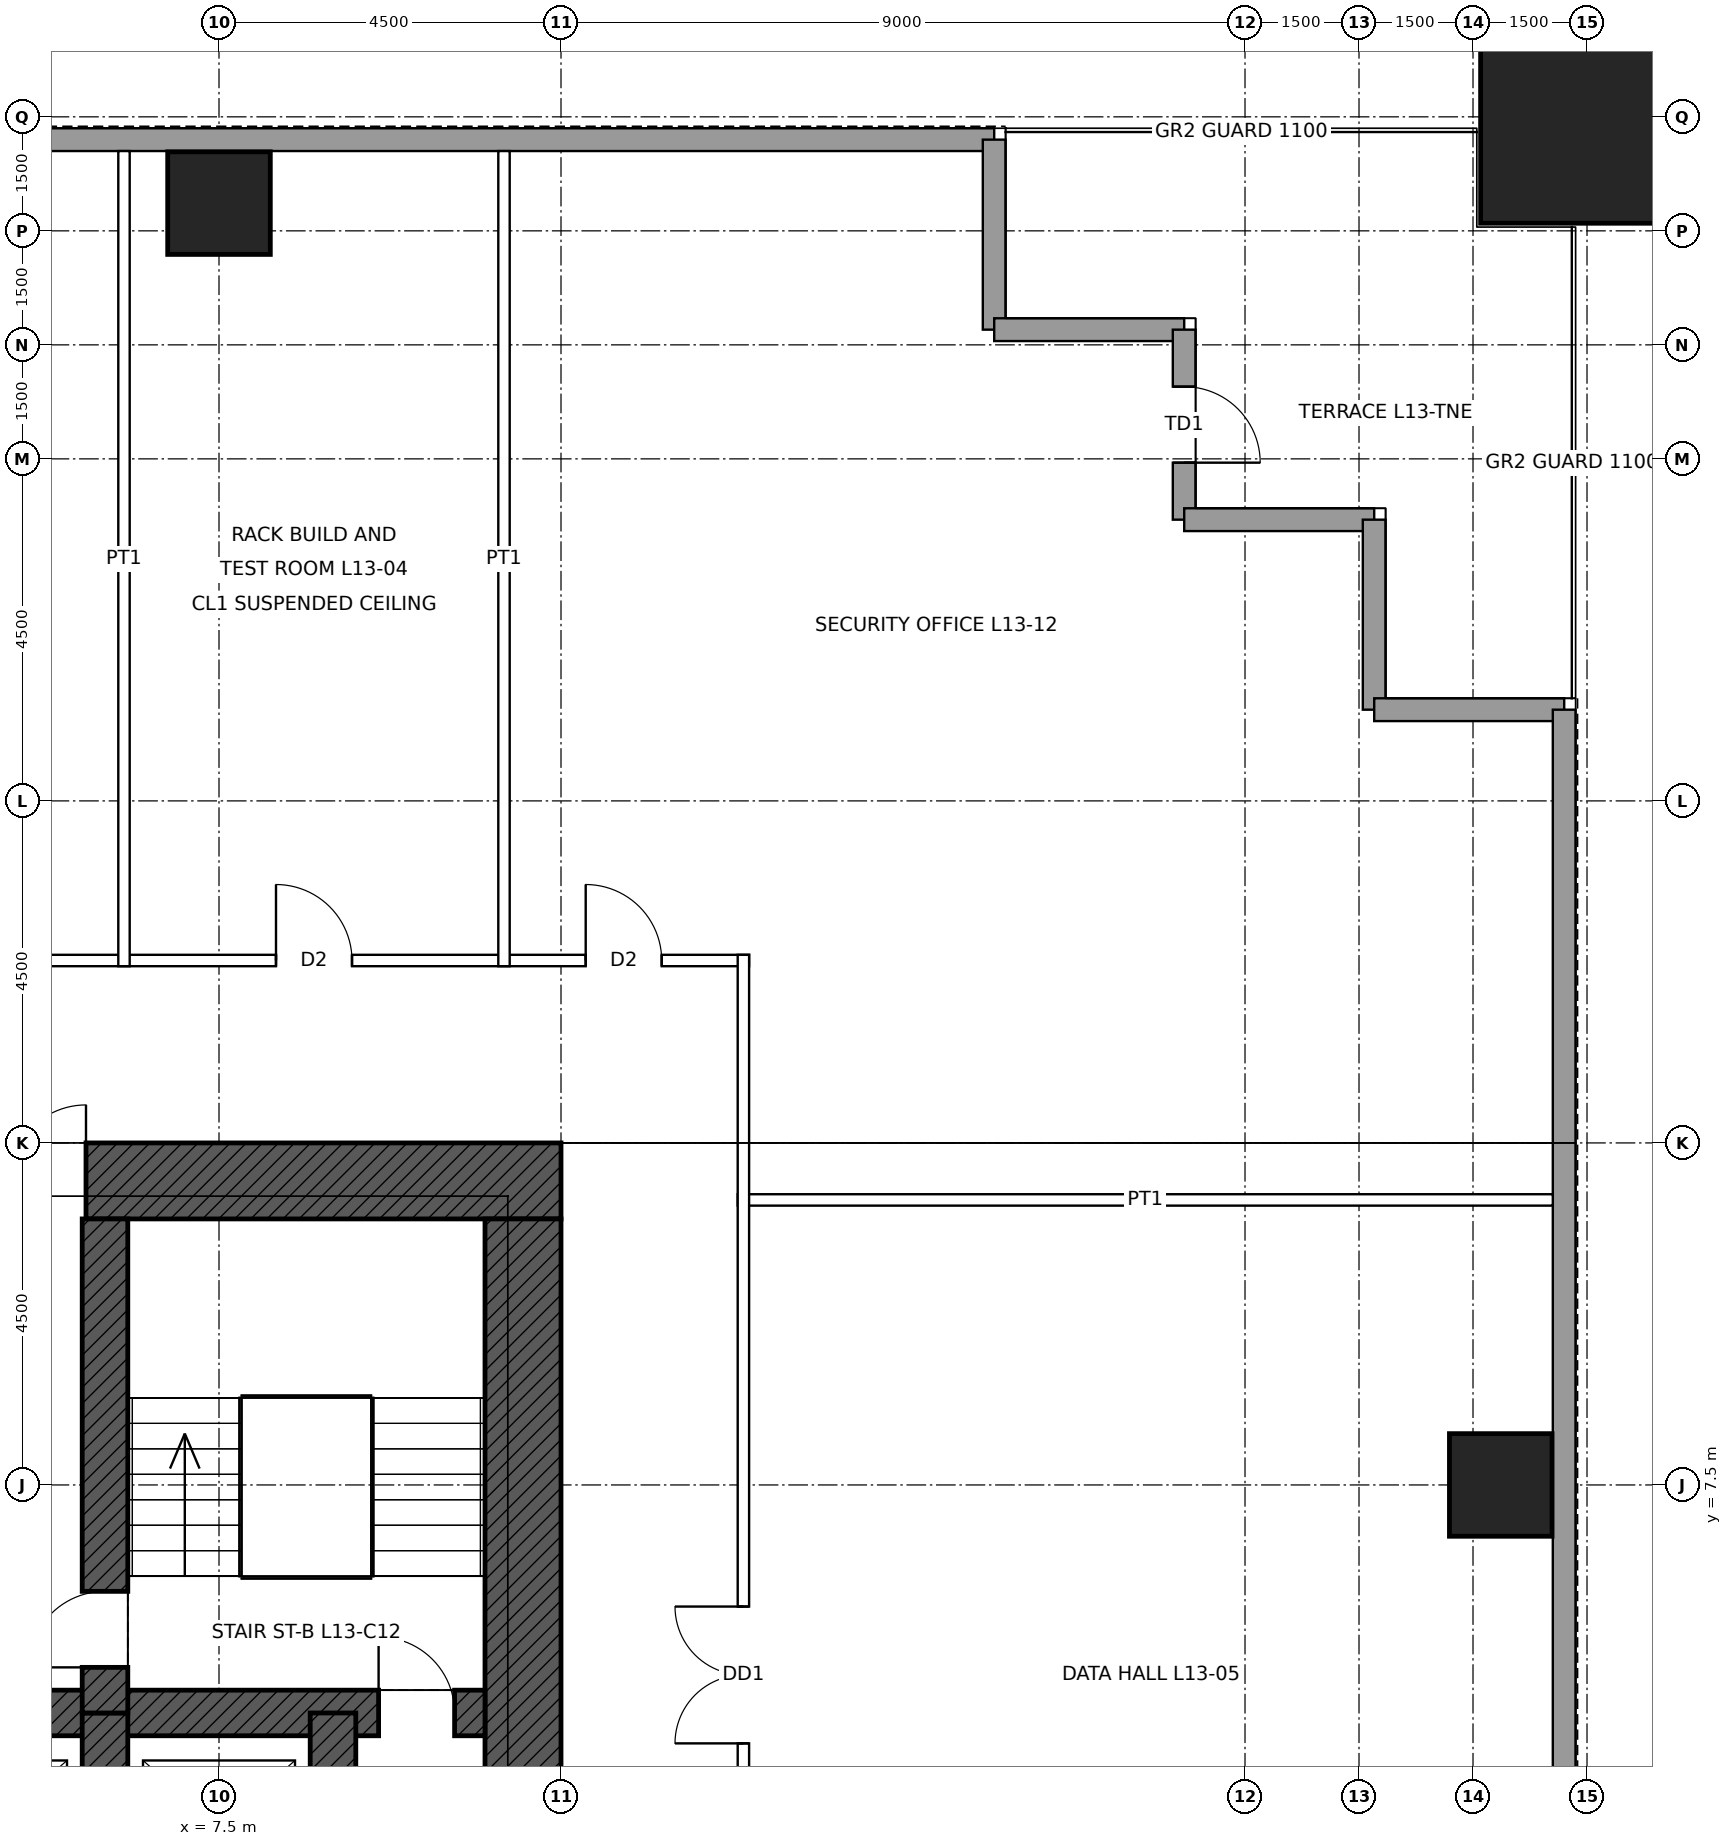
"""IFC4 building model, lengths in metres.
Left out: names, types, materials, properties, quantities, classifications, styles, units other than length and angle.
Written with IfcOpenShell. Run it as: python <this file> out.ifc"""

import sys

from ifc_helpers import new_model, si_unit, direction, frame, frame_2d, origin, origin_2d, place, context, subcontext, project, spatial, rectangle, hollow_rectangle, extrude, element, fill, save


model = new_model("IFC4")
c1 = context("Model", 3, precision=1e-05, world=origin(), true_north=direction((0.0, 1.0)))
c2 = subcontext(c1, "Body", "Model", "MODEL_VIEW")
j1 = project(units=[si_unit("LENGTHUNIT", "METRE"), si_unit("PLANEANGLEUNIT", "RADIAN")], contexts=[c1])
p1 = place(None, origin())
s1 = spatial("IfcSite", under=j1, at=p1, CompositionType="ELEMENT")
p2 = place(p1, origin())
s2 = spatial("IfcBuilding", under=s1, at=p2, CompositionType="ELEMENT")
p3 = place(p2, frame((0.0, 0.0, 68.4)))
s3 = spatial("IfcBuildingStorey", under=s2, at=p3, CompositionType="ELEMENT", Elevation=68.4)
p4 = place(p3, frame((25.5, 25.5, 0.0), z_axis=(0.0, 0.0, 1.0), x_axis=(1.0, 0.0, 0.0)))
e1 = element("IfcColumn", 1, at=p4, inside=s3, PredefinedType="COLUMN", context=c2, shape_type="SweptSolid", body=[
    extrude(hollow_rectangle(XDim=2.8, YDim=2.8, WallThickness=0.14, at=origin_2d()), origin(), (0.0, 0.0, 1.0), 5.0),
])
for number, where, z_axis, x_axis in (
    (2, (7.5, 24.365, 0.0), (0.0, 0.0, 1.0), (1.0, 0.0, 0.0)),
    (3, (24.365, 7.5, 0.0), (0.0, 0.0, 1.0), (1.0, 0.0, 0.0)),
):
    element("IfcColumn", number, at=place(p3, frame(where, z_axis=z_axis, x_axis=x_axis)), inside=s3, PredefinedType="COLUMN", context=c2, shape_type="SweptSolid", body=[
        extrude(hollow_rectangle(XDim=1.35, YDim=1.35, WallThickness=0.085, at=origin_2d()), origin(), (0.0, 0.0, 1.0), 5.0),
    ])
p5 = place(p3, frame((-12.0, 11.5, 0.0), z_axis=(0.0, 0.0, 1.0), x_axis=(1.0, 0.0, 0.0)))
e4 = element("IfcWall", 4, at=p5, inside=s3, PredefinedType="SHEAR", context=c2, shape_type="SweptSolid", body=[
    extrude(rectangle(XDim=24.0, YDim=1.0, at=frame_2d((12.0, 0.0))), origin(), (0.0, 0.0, 1.0), 5.0),
])
p6 = place(p5, frame((6.25, 0.0, 0.0)))
e5 = element("IfcOpeningElement", 5, at=p6, cuts=e4, PredefinedType="OPENING", context=c2, shape_type="SweptSolid", body=[
    extrude(rectangle(XDim=1.0, YDim=2.4, at=frame_2d((0.5, 1.2))), frame((0.0, 0.51, 0.0), z_axis=(0.0, -1.0, 0.0), x_axis=(1.0, 0.0, 0.0)), (0.0, 0.0, 1.0), 1.02),
])
p7 = place(p5, frame((16.75, 0.0, 0.0)))
e6 = element("IfcOpeningElement", 6, at=p7, cuts=e4, PredefinedType="OPENING", context=c2, shape_type="SweptSolid", body=[
    extrude(rectangle(XDim=1.0, YDim=2.4, at=frame_2d((0.5, 1.2))), frame((0.0, 0.51, 0.0), z_axis=(0.0, -1.0, 0.0), x_axis=(1.0, 0.0, 0.0)), (0.0, 0.0, 1.0), 1.02),
])
p8 = place(p3, frame((11.5, 11.0, 0.0), z_axis=(0.0, 0.0, 1.0), x_axis=(0.0, -1.0, 0.0)))
e7 = element("IfcWall", 7, at=p8, inside=s3, PredefinedType="SHEAR", context=c2, shape_type="SweptSolid", body=[
    extrude(rectangle(XDim=22.0, YDim=1.0, at=frame_2d((11.0, 0.0))), origin(), (0.0, 0.0, 1.0), 5.0),
])
p9 = place(p8, frame((10.5, 0.0, 0.0)))
e8 = element("IfcOpeningElement", 8, at=p9, cuts=e7, PredefinedType="OPENING", context=c2, shape_type="SweptSolid", body=[
    extrude(rectangle(XDim=1.0, YDim=2.4, at=frame_2d((0.5, 1.2))), frame((0.0, 0.51, 0.0), z_axis=(0.0, -1.0, 0.0), x_axis=(1.0, 0.0, 0.0)), (0.0, 0.0, 1.0), 1.02),
])
p10 = place(p3, frame((-11.0, 4.5, 0.0), z_axis=(0.0, 0.0, 1.0), x_axis=(1.0, 0.0, 0.0)))
e9 = element("IfcWall", 9, at=p10, inside=s3, PredefinedType="SHEAR", context=c2, shape_type="SweptSolid", body=[
    extrude(rectangle(XDim=22.0, YDim=0.6, at=frame_2d((11.0, 0.0))), origin(), (0.0, 0.0, 1.0), 5.0),
])
p11 = place(p10, frame((0.4, 0.0, 0.0)))
e10 = element("IfcOpeningElement", 10, at=p11, cuts=e9, PredefinedType="OPENING", context=c2, shape_type="SweptSolid", body=[
    extrude(rectangle(XDim=1.0, YDim=2.1, at=frame_2d((0.5, 1.05))), frame((0.0, 0.31, 0.0), z_axis=(0.0, -1.0, 0.0), x_axis=(1.0, 0.0, 0.0)), (0.0, 0.0, 1.0), 0.62),
])
p12 = place(p10, frame((20.6, 0.0, 0.0)))
e11 = element("IfcOpeningElement", 11, at=p12, cuts=e9, PredefinedType="OPENING", context=c2, shape_type="SweptSolid", body=[
    extrude(rectangle(XDim=1.0, YDim=2.1, at=frame_2d((0.5, 1.05))), frame((0.0, 0.31, 0.0), z_axis=(0.0, -1.0, 0.0), x_axis=(1.0, 0.0, 0.0)), (0.0, 0.0, 1.0), 0.62),
])
for number, where, z_axis, x_axis in (
    (12, (9.0, 1.5, 0.0), (0.0, 0.0, 1.0), (0.0, 1.0, 0.0)),
    (13, (6.0, 1.5, 0.0), (0.0, 0.0, 1.0), (0.0, 1.0, 0.0)),
):
    element("IfcWall", number, at=place(p3, frame(where, z_axis=z_axis, x_axis=x_axis)), inside=s3, PredefinedType="SHEAR", context=c2, shape_type="SweptSolid", body=[
        extrude(rectangle(XDim=3.0, YDim=0.6, at=frame_2d((1.5, 0.0))), origin(), (0.0, 0.0, 1.0), 5.0),
    ])
p13 = place(p3, frame((6.0, 4.5, 0.0), z_axis=(0.0, 0.0, 1.0), x_axis=(0.0, 1.0, 0.0)))
e14 = element("IfcWall", 14, at=p13, inside=s3, PredefinedType="SHEAR", context=c2, shape_type="SweptSolid", body=[
    extrude(rectangle(XDim=6.5, YDim=0.6, at=frame_2d((3.25, 0.0))), origin(), (0.0, 0.0, 1.0), 5.0),
])
p14 = place(p13, frame((0.6, 0.0, 0.0)))
e15 = element("IfcOpeningElement", 15, at=p14, cuts=e14, PredefinedType="OPENING", context=c2, shape_type="SweptSolid", body=[
    extrude(rectangle(XDim=1.0, YDim=2.1, at=frame_2d((0.5, 1.05))), frame((0.0, 0.31, 0.0), z_axis=(0.0, -1.0, 0.0), x_axis=(1.0, 0.0, 0.0)), (0.0, 0.0, 1.0), 0.62),
])
p15 = place(p3, frame((-17.7, 25.2, 0.0), z_axis=(0.0, 0.0, 1.0), x_axis=(1.0, 0.0, 0.0)))
e16 = element("IfcWall", 16, at=p15, inside=s3, PredefinedType="SOLIDWALL", context=c2, shape_type="SweptSolid", body=[
    extrude(rectangle(XDim=35.4, YDim=0.3, at=frame_2d((17.7, 0.0))), origin(), (0.0, 0.0, 1.0), 4.8),
])
for number, where, z_axis, x_axis in (
    (17, (17.7, 25.2, 0.0), (0.0, 0.0, 1.0), (0.0, -1.0, 0.0)),
    (18, (17.7, 22.7, 0.0), (0.0, 0.0, 1.0), (1.0, 0.0, 0.0)),
):
    element("IfcWall", number, at=place(p3, frame(where, z_axis=z_axis, x_axis=x_axis)), inside=s3, PredefinedType="SOLIDWALL", context=c2, shape_type="SweptSolid", body=[
        extrude(rectangle(XDim=2.5, YDim=0.3, at=frame_2d((1.25, 0.0))), origin(), (0.0, 0.0, 1.0), 4.8),
    ])
p16 = place(p3, frame((20.2, 22.7, 0.0), z_axis=(0.0, 0.0, 1.0), x_axis=(0.0, -1.0, 0.0)))
e19 = element("IfcWall", 19, at=p16, inside=s3, PredefinedType="SOLIDWALL", context=c2, shape_type="SweptSolid", body=[
    extrude(rectangle(XDim=2.5, YDim=0.3, at=frame_2d((1.25, 0.0))), origin(), (0.0, 0.0, 1.0), 4.8),
])
p17 = place(p16, frame((0.75, 0.0, 0.0)))
e20 = element("IfcOpeningElement", 20, at=p17, cuts=e19, PredefinedType="OPENING", context=c2, shape_type="SweptSolid", body=[
    extrude(rectangle(XDim=1.0, YDim=2.4, at=frame_2d((0.5, 1.2))), frame((0.0, 0.16, 0.0), z_axis=(0.0, -1.0, 0.0), x_axis=(1.0, 0.0, 0.0)), (0.0, 0.0, 1.0), 0.32),
])
for number, where, z_axis, x_axis in (
    (21, (20.2, 20.2, 0.0), (0.0, 0.0, 1.0), (1.0, 0.0, 0.0)),
    (22, (22.7, 20.2, 0.0), (0.0, 0.0, 1.0), (0.0, -1.0, 0.0)),
    (23, (22.7, 17.7, 0.0), (0.0, 0.0, 1.0), (1.0, 0.0, 0.0)),
):
    element("IfcWall", number, at=place(p3, frame(where, z_axis=z_axis, x_axis=x_axis)), inside=s3, PredefinedType="SOLIDWALL", context=c2, shape_type="SweptSolid", body=[
        extrude(rectangle(XDim=2.5, YDim=0.3, at=frame_2d((1.25, 0.0))), origin(), (0.0, 0.0, 1.0), 4.8),
    ])
p18 = place(p3, frame((25.2, 17.7, 0.0), z_axis=(0.0, 0.0, 1.0), x_axis=(0.0, -1.0, 0.0)))
e24 = element("IfcWall", 24, at=p18, inside=s3, PredefinedType="SOLIDWALL", context=c2, shape_type="SweptSolid", body=[
    extrude(rectangle(XDim=35.4, YDim=0.3, at=frame_2d((17.7, 0.0))), origin(), (0.0, 0.0, 1.0), 4.8),
])
p19 = place(p3, frame((14.325, 11.25, 0.0), z_axis=(0.0, 0.0, 1.0), x_axis=(1.0, 0.0, 0.0)))
e25 = element("IfcWall", 25, at=p19, inside=s3, PredefinedType="PARTITIONING", context=c2, shape_type="SweptSolid", body=[
    extrude(rectangle(XDim=10.725, YDim=0.15, at=frame_2d((5.363, 0.0))), origin(), (0.0, 0.0, 1.0), 3.853),
])
p20 = place(p3, frame((-14.475, 14.4, 0.0), z_axis=(0.0, 0.0, 1.0), x_axis=(1.0, 0.0, 0.0)))
e26 = element("IfcWall", 26, at=p20, inside=s3, PredefinedType="PARTITIONING", context=c2, shape_type="SweptSolid", body=[
    extrude(rectangle(XDim=28.95, YDim=0.15, at=frame_2d((14.475, 0.0))), origin(), (0.0, 0.0, 1.0), 4.8),
])
p21 = place(p20, frame((4.825, 0.0, 0.0)))
e27 = element("IfcOpeningElement", 27, at=p21, cuts=e26, PredefinedType="OPENING", context=c2, shape_type="SweptSolid", body=[
    extrude(rectangle(XDim=1.8, YDim=2.4, at=frame_2d((0.9, 1.2))), frame((0.0, 0.085, 0.0), z_axis=(0.0, -1.0, 0.0), x_axis=(1.0, 0.0, 0.0)), (0.0, 0.0, 1.0), 0.17),
])
p22 = place(p20, frame((13.575, 0.0, 0.0)))
e28 = element("IfcOpeningElement", 28, at=p22, cuts=e26, PredefinedType="OPENING", context=c2, shape_type="SweptSolid", body=[
    extrude(rectangle(XDim=1.8, YDim=2.4, at=frame_2d((0.9, 1.2))), frame((0.0, 0.085, 0.0), z_axis=(0.0, -1.0, 0.0), x_axis=(1.0, 0.0, 0.0)), (0.0, 0.0, 1.0), 0.17),
])
p23 = place(p20, frame((22.725, 0.0, 0.0)))
e29 = element("IfcOpeningElement", 29, at=p23, cuts=e26, PredefinedType="OPENING", context=c2, shape_type="SweptSolid", body=[
    extrude(rectangle(XDim=1.0, YDim=2.1, at=frame_2d((0.5, 1.05))), frame((0.0, 0.085, 0.0), z_axis=(0.0, -1.0, 0.0), x_axis=(1.0, 0.0, 0.0)), (0.0, 0.0, 1.0), 0.17),
])
p24 = place(p20, frame((26.8, 0.0, 0.0)))
e30 = element("IfcOpeningElement", 30, at=p24, cuts=e26, PredefinedType="OPENING", context=c2, shape_type="SweptSolid", body=[
    extrude(rectangle(XDim=1.0, YDim=2.1, at=frame_2d((0.5, 1.05))), frame((0.0, 0.085, 0.0), z_axis=(0.0, -1.0, 0.0), x_axis=(1.0, 0.0, 0.0)), (0.0, 0.0, 1.0), 0.17),
])
p25 = place(p20, frame((1.15, 0.0, 0.0)))
e31 = element("IfcOpeningElement", 31, at=p25, cuts=e26, PredefinedType="OPENING", context=c2, shape_type="SweptSolid", body=[
    extrude(rectangle(XDim=1.0, YDim=2.1, at=frame_2d((0.5, 1.05))), frame((0.0, 0.085, 0.0), z_axis=(0.0, -1.0, 0.0), x_axis=(1.0, 0.0, 0.0)), (0.0, 0.0, 1.0), 0.17),
])
p26 = place(p3, frame((6.25, 14.325, 0.0), z_axis=(0.0, 0.0, 1.0), x_axis=(0.0, 1.0, 0.0)))
e32 = element("IfcWall", 32, at=p26, inside=s3, PredefinedType="PARTITIONING", context=c2, shape_type="SweptSolid", body=[
    extrude(rectangle(XDim=10.725, YDim=0.15, at=frame_2d((5.363, 0.0))), origin(), (0.0, 0.0, 1.0), 4.8),
])
p27 = place(p3, frame((11.25, 14.325, 0.0), z_axis=(0.0, 0.0, 1.0), x_axis=(0.0, 1.0, 0.0)))
e33 = element("IfcWall", 33, at=p27, inside=s3, PredefinedType="PARTITIONING", context=c2, shape_type="SweptSolid", body=[
    extrude(rectangle(XDim=10.725, YDim=0.15, at=frame_2d((5.363, 0.0))), origin(), (0.0, 0.0, 1.0), 3.853),
])
p28 = place(p3, frame((14.4, -14.475, 0.0), z_axis=(0.0, 0.0, 1.0), x_axis=(0.0, 1.0, 0.0)))
e34 = element("IfcWall", 34, at=p28, inside=s3, PredefinedType="PARTITIONING", context=c2, shape_type="SweptSolid", body=[
    extrude(rectangle(XDim=28.95, YDim=0.15, at=frame_2d((14.475, 0.0))), origin(), (0.0, 0.0, 1.0), 4.8),
])
p29 = place(p28, frame((18.575, 0.0, 0.0)))
e35 = element("IfcOpeningElement", 35, at=p29, cuts=e34, PredefinedType="OPENING", context=c2, shape_type="SweptSolid", body=[
    extrude(rectangle(XDim=1.8, YDim=2.4, at=frame_2d((0.9, 1.2))), frame((0.0, 0.085, 0.0), z_axis=(0.0, -1.0, 0.0), x_axis=(1.0, 0.0, 0.0)), (0.0, 0.0, 1.0), 0.17),
])
p30 = place(p28, frame((7.325, 0.0, 0.0)))
e36 = element("IfcOpeningElement", 36, at=p30, cuts=e34, PredefinedType="OPENING", context=c2, shape_type="SweptSolid", body=[
    extrude(rectangle(XDim=1.8, YDim=2.4, at=frame_2d((0.9, 1.2))), frame((0.0, 0.085, 0.0), z_axis=(0.0, -1.0, 0.0), x_axis=(1.0, 0.0, 0.0)), (0.0, 0.0, 1.0), 0.17),
])
p31 = place(p17, origin())
e37 = element("IfcDoor", 37, at=p31, inside=s3, OperationType="SINGLE_SWING_RIGHT", PredefinedType="DOOR", context=c2, shape_type="SweptSolid", body=[
    extrude(rectangle(XDim=1.0, YDim=2.4, at=frame_2d((0.5, 1.2))), frame((0.0, 0.025, 0.0), z_axis=(0.0, -1.0, 0.0), x_axis=(1.0, 0.0, 0.0)), (0.0, 0.0, 1.0), 0.05),
])
fill(e20, e37)
p32 = place(p12, origin())
e38 = element("IfcDoor", 38, at=p32, inside=s3, OperationType="SINGLE_SWING_LEFT", PredefinedType="DOOR", context=c2, shape_type="SweptSolid", body=[
    extrude(rectangle(XDim=1.0, YDim=2.1, at=frame_2d((0.5, 1.05))), frame((0.0, 0.025, 0.0), z_axis=(0.0, -1.0, 0.0), x_axis=(1.0, 0.0, 0.0)), (0.0, 0.0, 1.0), 0.05),
])
fill(e11, e38)
p33 = place(p14, origin())
e39 = element("IfcDoor", 39, at=p33, inside=s3, OperationType="SINGLE_SWING_LEFT", PredefinedType="DOOR", context=c2, shape_type="SweptSolid", body=[
    extrude(rectangle(XDim=1.0, YDim=2.1, at=frame_2d((0.5, 1.05))), frame((0.0, 0.025, 0.0), z_axis=(0.0, -1.0, 0.0), x_axis=(1.0, 0.0, 0.0)), (0.0, 0.0, 1.0), 0.05),
])
fill(e15, e39)
p34 = place(p7, origin())
e40 = element("IfcDoor", 40, at=p34, inside=s3, OperationType="SINGLE_SWING_RIGHT", PredefinedType="DOOR", context=c2, shape_type="SweptSolid", body=[
    extrude(rectangle(XDim=1.0, YDim=2.4, at=frame_2d((0.5, 1.2))), frame((0.0, 0.485, 0.0), z_axis=(0.0, -1.0, 0.0), x_axis=(1.0, 0.0, 0.0)), (0.0, 0.0, 1.0), 0.05),
])
fill(e6, e40)
p35 = place(p23, origin())
e41 = element("IfcDoor", 41, at=p35, inside=s3, OperationType="SINGLE_SWING_LEFT", PredefinedType="DOOR", context=c2, shape_type="SweptSolid", body=[
    extrude(rectangle(XDim=1.0, YDim=2.1, at=frame_2d((0.5, 1.05))), frame((0.0, 0.025, 0.0), z_axis=(0.0, -1.0, 0.0), x_axis=(1.0, 0.0, 0.0)), (0.0, 0.0, 1.0), 0.05),
])
fill(e29, e41)
p36 = place(p29, origin())
e42 = element("IfcDoor", 42, at=p36, inside=s3, OperationType="DOUBLE_DOOR_SINGLE_SWING", PredefinedType="DOOR", context=c2, shape_type="SweptSolid", body=[
    extrude(rectangle(XDim=1.8, YDim=2.4, at=frame_2d((0.9, 1.2))), frame((0.0, 0.025, 0.0), z_axis=(0.0, -1.0, 0.0), x_axis=(1.0, 0.0, 0.0)), (0.0, 0.0, 1.0), 0.05),
])
fill(e35, e42)
p37 = place(p24, origin())
e43 = element("IfcDoor", 43, at=p37, inside=s3, OperationType="SINGLE_SWING_LEFT", PredefinedType="DOOR", context=c2, shape_type="SweptSolid", body=[
    extrude(rectangle(XDim=1.0, YDim=2.1, at=frame_2d((0.5, 1.05))), frame((0.0, 0.025, 0.0), z_axis=(0.0, -1.0, 0.0), x_axis=(1.0, 0.0, 0.0)), (0.0, 0.0, 1.0), 0.05),
])
fill(e30, e43)
save(model, sys.argv[1])
